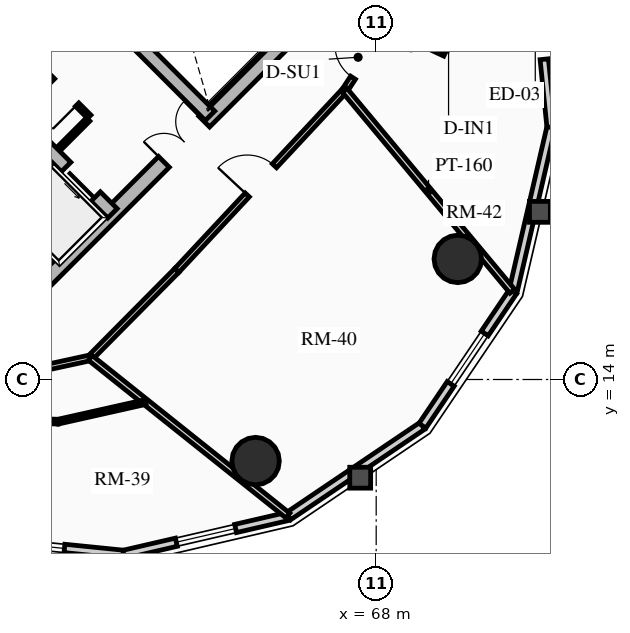
"""IFC4 building model, lengths in metres.
Left out: names, types, materials, properties, quantities, classifications, styles, units other than length and angle.
Written with IfcOpenShell. Run it as: python <this file> out.ifc"""

import sys

from ifc_helpers import new_model, si_unit, direction, frame, frame_2d, origin, origin_2d, place, context, subcontext, project, spatial, rectangle, circle, extrude, source, transform, mapped, element, fill, save


model = new_model("IFC4")
c1 = context("Model", 3, precision=1e-05, world=origin(), true_north=direction((0.0, 1.0)))
c2 = subcontext(c1, "Body", "Model", "MODEL_VIEW")
j1 = project(units=[si_unit("LENGTHUNIT", "METRE"), si_unit("PLANEANGLEUNIT", "RADIAN")], contexts=[c1])
p1 = place(None, origin())
s1 = spatial("IfcSite", under=j1, at=p1, CompositionType="ELEMENT")
p2 = place(p1, origin())
s2 = spatial("IfcBuilding", under=s1, at=p2, CompositionType="ELEMENT")
p3 = place(p2, frame((0.0, 0.0, 171.97)))
s3 = spatial("IfcBuildingStorey", under=s2, at=p3, CompositionType="ELEMENT", Elevation=171.97)
p4 = place(p3, frame((58.561, 15.873, 0.0), z_axis=(0.0, 0.0, 1.0), x_axis=(0.707106781187, 0.707106781187, 0.0)))
e1 = element("IfcWall", 1, at=p4, inside=s3, PredefinedType="SHEAR", context=c2, shape_type="SweptSolid", body=[
    extrude(rectangle(XDim=10.7, YDim=0.4, at=frame_2d((5.35, 0.0))), origin(), (0.0, 0.0, 1.0), 2.91),
])
m1 = source(origin(), c2, "Body", "SweptSolid", [
    extrude(rectangle(XDim=1.5, YDim=2.02, at=frame_2d((0.75, 1.01))), frame((0.0, 0.21, 0.0), z_axis=(0.0, -1.0, 0.0), x_axis=(1.0, 0.0, 0.0)), (0.0, 0.0, 1.0), 0.42),
])
p5 = place(p4, frame((5.45, 0.0, 0.0)))
e2 = element("IfcOpeningElement", 2, at=p5, cuts=e1, PredefinedType="OPENING", context=c2, shape_type="MappedRepresentation", body=[
    mapped(m1, transform((0.0, 0.0, 0.0), x_axis=(1.0, 0.0, 0.0), y_axis=(0.0, 1.0, 0.0), z_axis=(0.0, 0.0, 1.0), scale=1.0)),
])
p6 = place(p3, frame((61.06, 18.373, 0.0), z_axis=(0.0, 0.0, 1.0), x_axis=(-0.707106781187, 0.707106781187, 0.0)))
e3 = element("IfcWall", 3, at=p6, inside=s3, PredefinedType="SHEAR", context=c2, shape_type="SweptSolid", body=[
    extrude(rectangle(XDim=13.7, YDim=0.35, at=frame_2d((6.85, 0.0))), origin(), (0.0, 0.0, 1.0), 2.91),
])
m2 = source(origin(), c2, "Body", "SweptSolid", [
    extrude(rectangle(XDim=1.1, YDim=2.015, at=frame_2d((0.55, 1.007))), frame((0.0, 0.185, 0.0), z_axis=(0.0, -1.0, 0.0), x_axis=(1.0, 0.0, 0.0)), (0.0, 0.0, 1.0), 0.37),
])
p7 = place(p6, frame((4.85, 0.0, 0.0)))
e4 = element("IfcOpeningElement", 4, at=p7, cuts=e3, PredefinedType="OPENING", context=c2, shape_type="MappedRepresentation", body=[
    mapped(m2, transform((0.0, 0.0, 0.0), x_axis=(1.0, 0.0, 0.0), y_axis=(0.0, 1.0, 0.0), z_axis=(0.0, 0.0, 1.0), scale=1.0)),
])
p8 = place(p6, frame((0.625, 0.0, 0.0)))
e5 = element("IfcOpeningElement", 5, at=p8, cuts=e3, PredefinedType="OPENING", context=c2, shape_type="MappedRepresentation", body=[
    mapped(m2, transform((0.0, 0.0, 0.0), x_axis=(1.0, 0.0, 0.0), y_axis=(0.0, 1.0, 0.0), z_axis=(0.0, 0.0, 1.0), scale=1.0)),
])
p9 = place(p6, frame((2.625, 0.0, 0.0)))
e6 = element("IfcOpeningElement", 6, at=p9, cuts=e3, PredefinedType="OPENING", context=c2, shape_type="MappedRepresentation", body=[
    mapped(m2, transform((0.0, 0.0, 0.0), x_axis=(1.0, 0.0, 0.0), y_axis=(0.0, 1.0, 0.0), z_axis=(0.0, 0.0, 1.0), scale=1.0)),
])
m3 = source(origin(), c2, "Body", "SweptSolid", [
    extrude(rectangle(XDim=1.15, YDim=2.02, at=frame_2d((0.575, 1.01))), frame((0.0, 0.185, 0.0), z_axis=(0.0, -1.0, 0.0), x_axis=(1.0, 0.0, 0.0)), (0.0, 0.0, 1.0), 0.37),
])
p10 = place(p6, frame((7.27, 0.0, 0.0)))
e7 = element("IfcOpeningElement", 7, at=p10, cuts=e3, PredefinedType="OPENING", context=c2, shape_type="MappedRepresentation", body=[
    mapped(m3, transform((0.0, 0.0, 0.0), x_axis=(1.0, 0.0, 0.0), y_axis=(0.0, 1.0, 0.0), z_axis=(0.0, 0.0, 1.0), scale=1.0)),
])
p11 = place(p3, frame((63.627, 20.94, 0.0), z_axis=(0.0, 0.0, 1.0), x_axis=(-0.707119496762, 0.707094065383, 0.0)))
e8 = element("IfcWall", 8, at=p11, inside=s3, PredefinedType="SHEAR", context=c2, shape_type="SweptSolid", body=[
    extrude(rectangle(XDim=9.6, YDim=0.35, at=frame_2d((4.8, 0.0))), origin(), (0.0, 0.0, 1.0), 2.91),
])
p12 = place(p11, frame((5.28, 0.0, 0.0)))
e9 = element("IfcOpeningElement", 9, at=p12, cuts=e8, PredefinedType="OPENING", context=c2, shape_type="MappedRepresentation", body=[
    mapped(m3, transform((0.0, 0.0, 0.0), x_axis=(1.0, 0.0, 0.0), y_axis=(0.0, 1.0, 0.0), z_axis=(0.0, 0.0, 1.0), scale=1.0)),
])
for number, where, z_axis, x_axis in (
    (10, (64.827, 11.854, 0.0), (0.0, 0.0, 1.0), (1.0, 0.0, 0.0)),
    (11, (70.146, 17.173, 0.0), (0.0, 0.0, 1.0), (1.0, 0.0, 0.0)),
):
    element("IfcColumn", number, at=place(p3, frame(where, z_axis=z_axis, x_axis=x_axis)), inside=s3, PredefinedType="USERDEFINED", context=c2, shape_type="SweptSolid", body=[
        extrude(circle(Radius=0.625, at=origin_2d()), origin(), (0.0, 0.0, 1.0), 2.91),
    ])
p13 = place(p3, frame((61.355, 9.397, 0.0), z_axis=(0.0, 0.0, 1.0), x_axis=(-0.994943283129, 0.100438356004, 0.0)))
e12 = element("IfcWall", 12, at=p13, inside=s3, PredefinedType="SOLIDWALL", context=c2, shape_type="SweptSolid", body=[
    extrude(rectangle(XDim=4.733, YDim=0.22, at=frame_2d((2.366, 0.0))), origin(), (0.0, 0.0, 1.0), 2.245),
])
m4 = source(origin(), c2, "Body", "SweptSolid", [
    extrude(rectangle(XDim=1.6, YDim=1.3, at=frame_2d((0.8, 0.65))), frame((0.0, 0.12, 0.0), z_axis=(0.0, -1.0, 0.0), x_axis=(1.0, 0.0, 0.0)), (0.0, 0.0, 1.0), 0.24),
])
p14 = place(p13, frame((1.566, 0.0, 0.65)))
e13 = element("IfcOpeningElement", 13, at=p14, cuts=e12, PredefinedType="OPENING", context=c2, shape_type="MappedRepresentation", body=[
    mapped(m4, transform((0.0, 0.0, 0.0), x_axis=(1.0, 0.0, 0.0), y_axis=(0.0, 1.0, 0.0), z_axis=(0.0, 0.0, 1.0), scale=1.0)),
])
p15 = place(p3, frame((65.687, 10.4, 0.0), z_axis=(0.0, 0.0, 1.0), x_axis=(-0.97422620202, -0.22557328587, 0.0)))
e14 = element("IfcWall", 14, at=p15, inside=s3, PredefinedType="SOLIDWALL", context=c2, shape_type="SweptSolid", body=[
    extrude(rectangle(XDim=4.446, YDim=0.22, at=frame_2d((2.223, 0.0))), origin(), (0.0, 0.0, 1.0), 2.245),
])
p16 = place(p15, frame((1.423, 0.0, 0.65)))
e15 = element("IfcOpeningElement", 15, at=p16, cuts=e14, PredefinedType="OPENING", context=c2, shape_type="MappedRepresentation", body=[
    mapped(m4, transform((0.0, 0.0, 0.0), x_axis=(1.0, 0.0, 0.0), y_axis=(0.0, 1.0, 0.0), z_axis=(0.0, 0.0, 1.0), scale=1.0)),
])
p17 = place(p3, frame((69.217, 12.783, 0.0), z_axis=(0.0, 0.0, 1.0), x_axis=(-0.828817439852, -0.55951912514, 0.0)))
e16 = element("IfcWall", 16, at=p17, inside=s3, PredefinedType="SOLIDWALL", context=c2, shape_type="SweptSolid", body=[
    extrude(rectangle(XDim=4.259, YDim=0.22, at=frame_2d((2.129, 0.0))), origin(), (0.0, 0.0, 1.0), 2.245),
])
p18 = place(p3, frame((71.6, 16.313, 0.0), z_axis=(0.0, 0.0, 1.0), x_axis=(-0.55951912514, -0.828817439852, 0.0)))
e17 = element("IfcWall", 17, at=p18, inside=s3, PredefinedType="SOLIDWALL", context=c2, shape_type="SweptSolid", body=[
    extrude(rectangle(XDim=4.259, YDim=0.22, at=frame_2d((2.129, 0.0))), origin(), (0.0, 0.0, 1.0), 2.245),
])
p19 = place(p18, frame((1.33, 0.0, 0.65)))
e18 = element("IfcOpeningElement", 18, at=p19, cuts=e17, PredefinedType="OPENING", context=c2, shape_type="MappedRepresentation", body=[
    mapped(m4, transform((0.0, 0.0, 0.0), x_axis=(1.0, 0.0, 0.0), y_axis=(0.0, 1.0, 0.0), z_axis=(0.0, 0.0, 1.0), scale=1.0)),
])
p20 = place(p3, frame((72.603, 20.645, 0.0), z_axis=(0.0, 0.0, 1.0), x_axis=(-0.22557328587, -0.97422620202, 0.0)))
e19 = element("IfcWall", 19, at=p20, inside=s3, PredefinedType="SOLIDWALL", context=c2, shape_type="SweptSolid", body=[
    extrude(rectangle(XDim=4.446, YDim=0.22, at=frame_2d((2.223, 0.0))), origin(), (0.0, 0.0, 1.0), 2.245),
])
p21 = place(p3, frame((72.127, 25.354, 0.0), z_axis=(0.0, 0.0, 1.0), x_axis=(0.100438356004, -0.994943283129, 0.0)))
e20 = element("IfcWall", 20, at=p21, inside=s3, PredefinedType="SOLIDWALL", context=c2, shape_type="SweptSolid", body=[
    extrude(rectangle(XDim=4.733, YDim=0.22, at=frame_2d((2.366, 0.0))), origin(), (0.0, 0.0, 1.0), 2.245),
])
m5 = source(origin(), c2, "Body", "SweptSolid", [
    extrude(rectangle(XDim=1.15, YDim=2.005, at=frame_2d((0.575, 1.002))), frame((0.0, 0.12, 0.0), z_axis=(0.0, -1.0, 0.0), x_axis=(1.0, 0.0, 0.0)), (0.0, 0.0, 1.0), 0.24),
])
p22 = place(p21, frame((1.791, 0.0, 0.0)))
e21 = element("IfcOpeningElement", 21, at=p22, cuts=e20, PredefinedType="OPENING", context=c2, shape_type="MappedRepresentation", body=[
    mapped(m5, transform((0.0, 0.0, 0.0), x_axis=(1.0, 0.0, 0.0), y_axis=(0.0, 1.0, 0.0), z_axis=(0.0, 0.0, 1.0), scale=1.0)),
])
p23 = place(p3, frame((58.214, 21.467, 0.0), z_axis=(0.0, 0.0, 1.0), x_axis=(0.707106781187, 0.707106781187, 0.0)))
e22 = element("IfcWall", 22, at=p23, inside=s3, PredefinedType="PARTITIONING", context=c2, shape_type="SweptSolid", body=[
    extrude(rectangle(XDim=3.28, YDim=0.2, at=frame_2d((1.64, 0.0))), origin(), (0.0, 0.0, 1.0), 2.675),
])
m6 = source(origin(), c2, "Body", "SweptSolid", [
    extrude(rectangle(XDim=1.5, YDim=2.02, at=frame_2d((0.75, 1.01))), frame((0.0, 0.11, 0.0), z_axis=(0.0, -1.0, 0.0), x_axis=(1.0, 0.0, 0.0)), (0.0, 0.0, 1.0), 0.22),
])
p24 = place(p23, frame((1.55, 0.0, 0.0)))
e23 = element("IfcOpeningElement", 23, at=p24, cuts=e22, PredefinedType="OPENING", context=c2, shape_type="MappedRepresentation", body=[
    mapped(m6, transform((0.0, 0.0, 0.0), x_axis=(1.0, 0.0, 0.0), y_axis=(0.0, 1.0, 0.0), z_axis=(0.0, 0.0, 1.0), scale=1.0)),
])
p25 = place(p3, frame((60.448, 20.915, 0.0), z_axis=(0.0, 0.0, 1.0), x_axis=(-0.707106781187, 0.707106781187, 0.0)))
e24 = element("IfcWall", 24, at=p25, inside=s3, PredefinedType="PARTITIONING", context=c2, shape_type="SweptSolid", body=[
    extrude(rectangle(XDim=1.87, YDim=0.125, at=frame_2d((0.935, 0.0))), origin(), (0.0, 0.0, 1.0), 2.675),
])
m7 = source(origin(), c2, "Body", "SweptSolid", [
    extrude(rectangle(XDim=0.9, YDim=2.005, at=frame_2d((0.45, 1.002))), frame((0.0, 0.073, 0.0), z_axis=(0.0, -1.0, 0.0), x_axis=(1.0, 0.0, 0.0)), (0.0, 0.0, 1.0), 0.145),
])
p26 = place(p25, frame((0.45, 0.0, 0.0)))
e25 = element("IfcOpeningElement", 25, at=p26, cuts=e24, PredefinedType="OPENING", context=c2, shape_type="MappedRepresentation", body=[
    mapped(m7, transform((0.0, 0.0, 0.0), x_axis=(1.0, 0.0, 0.0), y_axis=(0.0, 1.0, 0.0), z_axis=(0.0, 0.0, 1.0), scale=1.0)),
])
p27 = place(p3, frame((59.643, 20.066, 0.0), z_axis=(0.0, 0.0, 1.0), x_axis=(0.707106781187, 0.707106781187, 0.0)))
e26 = element("IfcWall", 26, at=p27, inside=s3, PredefinedType="PARTITIONING", context=c2, shape_type="SweptSolid", body=[
    extrude(rectangle(XDim=1.1, YDim=0.125, at=frame_2d((0.55, 0.0))), origin(), (0.0, 0.0, 1.0), 2.675),
])
p28 = place(p3, frame((58.959, 14.241, 0.0), z_axis=(0.0, 0.0, 1.0), x_axis=(0.977216106897, 0.212246744196, 0.0)))
e27 = element("IfcWall", 27, at=p28, inside=s3, PredefinedType="PARTITIONING", context=c2, shape_type="SweptSolid", body=[
    extrude(rectangle(XDim=1.552, YDim=0.15, at=frame_2d((0.776, 0.0))), origin(), (0.0, 0.0, 1.0), 2.245),
])
p29 = place(p3, frame((60.475, 14.57, 0.0), z_axis=(0.0, 0.0, 1.0), x_axis=(0.703709284374, 0.710488031628, 0.0)))
e28 = element("IfcWall", 28, at=p29, inside=s3, PredefinedType="PARTITIONING", context=c2, shape_type="SweptSolid", body=[
    extrude(rectangle(XDim=3.241, YDim=0.15, at=frame_2d((1.621, 0.0))), origin(), (0.0, 0.0, 1.0), 2.245),
])
p30 = place(p3, frame((62.756, 16.873, 0.0), z_axis=(0.0, 0.0, 1.0), x_axis=(0.682136885079, 0.73122450042, 0.0)))
e29 = element("IfcWall", 29, at=p30, inside=s3, PredefinedType="PARTITIONING", context=c2, shape_type="SweptSolid", body=[
    extrude(rectangle(XDim=6.476, YDim=0.15, at=frame_2d((3.238, 0.0))), origin(), (0.0, 0.0, 1.0), 2.245),
])
m8 = source(origin(), c2, "Body", "SweptSolid", [
    extrude(rectangle(XDim=1.05, YDim=2.015, at=frame_2d((0.525, 1.007))), frame((0.0, 0.085, 0.0), z_axis=(0.0, -1.0, 0.0), x_axis=(1.0, 0.0, 0.0)), (0.0, 0.0, 1.0), 0.17),
])
p31 = place(p30, frame((2.713, 0.0, 0.0)))
e30 = element("IfcOpeningElement", 30, at=p31, cuts=e29, PredefinedType="OPENING", context=c2, shape_type="MappedRepresentation", body=[
    mapped(m8, transform((0.0, 0.0, 0.0), x_axis=(1.0, 0.0, 0.0), y_axis=(0.0, 1.0, 0.0), z_axis=(0.0, 0.0, 1.0), scale=1.0)),
])
p32 = place(p3, frame((67.173, 21.608, 0.0), z_axis=(0.0, 0.0, 1.0), x_axis=(0.544299403682, 0.838891029367, 0.0)))
e31 = element("IfcWall", 31, at=p32, inside=s3, PredefinedType="PARTITIONING", context=c2, shape_type="SweptSolid", body=[
    extrude(rectangle(XDim=1.844, YDim=0.15, at=frame_2d((0.922, 0.0))), origin(), (0.0, 0.0, 1.0), 2.245),
])
p33 = place(p32, frame((0.397, 0.0, 0.0)))
e32 = element("IfcOpeningElement", 32, at=p33, cuts=e31, PredefinedType="OPENING", context=c2, shape_type="MappedRepresentation", body=[
    mapped(m8, transform((0.0, 0.0, 0.0), x_axis=(1.0, 0.0, 0.0), y_axis=(0.0, 1.0, 0.0), z_axis=(0.0, 0.0, 1.0), scale=1.0)),
])
p34 = place(p3, frame((60.475, 14.57, 0.0), z_axis=(0.0, 0.0, 1.0), x_axis=(0.78156967059, -0.623817962241, 0.0)))
e33 = element("IfcWall", 33, at=p34, inside=s3, PredefinedType="PARTITIONING", context=c2, shape_type="SweptSolid", body=[
    extrude(rectangle(XDim=6.656, YDim=0.16, at=frame_2d((3.328, 0.0))), origin(), (0.0, 0.0, 1.0), 2.245),
])
p35 = place(p3, frame((67.173, 21.608, 0.0), z_axis=(0.0, 0.0, 1.0), x_axis=(0.64050880156, -0.767950828585, 0.0)))
e34 = element("IfcWall", 34, at=p35, inside=s3, PredefinedType="PARTITIONING", context=c2, shape_type="SweptSolid", body=[
    extrude(rectangle(XDim=6.883, YDim=0.16, at=frame_2d((3.441, 0.0))), origin(), (0.0, 0.0, 1.0), 2.245),
])
p36 = place(p3, frame((57.263, 12.972, 0.0), z_axis=(0.0, 0.0, 1.0), x_axis=(0.999399614086, -0.034646953192, 0.0)))
e35 = element("IfcWall", 35, at=p36, inside=s3, PredefinedType="PARTITIONING", context=c2, shape_type="SweptSolid", body=[
    extrude(rectangle(XDim=2.368, YDim=0.125, at=frame_2d((1.184, 0.0))), origin(), (0.0, 0.0, 1.0), 2.245),
])
p37 = place(p3, frame((59.629, 12.89, 0.0), z_axis=(0.0, 0.0, 1.0), x_axis=(0.97566344203, 0.219273454585, 0.0)))
e36 = element("IfcWall", 36, at=p37, inside=s3, PredefinedType="PARTITIONING", context=c2, shape_type="SweptSolid", body=[
    extrude(rectangle(XDim=2.36, YDim=0.125, at=frame_2d((1.18, 0.0))), origin(), (0.0, 0.0, 1.0), 2.245),
])
p38 = place(p3, frame((68.275, 23.28, 0.0), z_axis=(0.0, 0.0, 1.0), x_axis=(0.906681243062, -0.421816457099, 0.0)))
e37 = element("IfcWall", 37, at=p38, inside=s3, PredefinedType="PARTITIONING", context=c2, shape_type="SweptSolid", body=[
    extrude(rectangle(XDim=1.688, YDim=0.125, at=frame_2d((0.844, 0.0))), origin(), (0.0, 0.0, 1.0), 2.675),
])
m9 = source(origin(), c2, "Body", "SweptSolid", [
    extrude(rectangle(XDim=1.6, YDim=1.3, at=frame_2d((0.8, 0.65))), frame((0.0, 0.03, 0.0), z_axis=(0.0, -1.0, 0.0), x_axis=(1.0, 0.0, 0.0)), (0.0, 0.0, 1.0), 0.06),
])
p39 = place(p14, origin())
e38 = element("IfcWindow", 38, at=p39, inside=s3, PartitioningType="SINGLE_PANEL", PredefinedType="WINDOW", context=c2, shape_type="MappedRepresentation", body=[
    mapped(m9, transform((0.0, 0.0, 0.0), x_axis=(1.0, 0.0, 0.0), y_axis=(0.0, 1.0, 0.0), z_axis=(0.0, 0.0, 1.0), scale=1.0)),
])
fill(e13, e38)
p40 = place(p16, origin())
e39 = element("IfcWindow", 39, at=p40, inside=s3, PartitioningType="SINGLE_PANEL", PredefinedType="WINDOW", context=c2, shape_type="MappedRepresentation", body=[
    mapped(m9, transform((0.0, 0.0, 0.0), x_axis=(1.0, 0.0, 0.0), y_axis=(0.0, 1.0, 0.0), z_axis=(0.0, 0.0, 1.0), scale=1.0)),
])
fill(e15, e39)
p41 = place(p19, origin())
e40 = element("IfcWindow", 40, at=p41, inside=s3, PartitioningType="SINGLE_PANEL", PredefinedType="WINDOW", context=c2, shape_type="MappedRepresentation", body=[
    mapped(m9, transform((0.0, 0.0, 0.0), x_axis=(1.0, 0.0, 0.0), y_axis=(0.0, 1.0, 0.0), z_axis=(0.0, 0.0, 1.0), scale=1.0)),
])
fill(e18, e40)
m10 = source(origin(), c2, "Body", "SweptSolid", [
    extrude(rectangle(XDim=1.15, YDim=2.005, at=frame_2d((0.575, 1.002))), frame((0.0, 0.025, 0.0), z_axis=(0.0, -1.0, 0.0), x_axis=(1.0, 0.0, 0.0)), (0.0, 0.0, 1.0), 0.05),
])
p42 = place(p22, origin())
e41 = element("IfcDoor", 41, at=p42, inside=s3, OperationType="SINGLE_SWING_LEFT", PredefinedType="DOOR", context=c2, shape_type="MappedRepresentation", body=[
    mapped(m10, transform((0.0, 0.0, 0.0), x_axis=(1.0, 0.0, 0.0), y_axis=(0.0, 1.0, 0.0), z_axis=(0.0, 0.0, 1.0), scale=1.0)),
])
fill(e21, e41)
m11 = source(origin(), c2, "Body", "SweptSolid", [
    extrude(rectangle(XDim=1.1, YDim=2.015, at=frame_2d((0.55, 1.007))), frame((0.0, 0.025, 0.0), z_axis=(0.0, -1.0, 0.0), x_axis=(1.0, 0.0, 0.0)), (0.0, 0.0, 1.0), 0.05),
])
p43 = place(p8, origin())
e42 = element("IfcDoor", 42, at=p43, inside=s3, OperationType="SLIDING_TO_LEFT", PredefinedType="DOOR", context=c2, shape_type="MappedRepresentation", body=[
    mapped(m11, transform((0.0, 0.0, 0.0), x_axis=(1.0, 0.0, 0.0), y_axis=(0.0, 1.0, 0.0), z_axis=(0.0, 0.0, 1.0), scale=1.0)),
])
fill(e5, e42)
m12 = source(origin(), c2, "Body", "SweptSolid", [
    extrude(rectangle(XDim=1.5, YDim=2.02, at=frame_2d((0.75, 1.01))), frame((0.0, 0.025, 0.0), z_axis=(0.0, -1.0, 0.0), x_axis=(1.0, 0.0, 0.0)), (0.0, 0.0, 1.0), 0.05),
])
p44 = place(p5, origin())
e43 = element("IfcDoor", 43, at=p44, inside=s3, OperationType="DOUBLE_DOOR_SINGLE_SWING", PredefinedType="DOOR", context=c2, shape_type="MappedRepresentation", body=[
    mapped(m12, transform((0.0, 0.0, 0.0), x_axis=(1.0, 0.0, 0.0), y_axis=(0.0, 1.0, 0.0), z_axis=(0.0, 0.0, 1.0), scale=1.0)),
])
fill(e2, e43)
p45 = place(p24, origin())
e44 = element("IfcDoor", 44, at=p45, inside=s3, OperationType="DOUBLE_DOOR_SINGLE_SWING", PredefinedType="DOOR", context=c2, shape_type="MappedRepresentation", body=[
    mapped(m12, transform((0.0, 0.0, 0.0), x_axis=(1.0, 0.0, 0.0), y_axis=(0.0, 1.0, 0.0), z_axis=(0.0, 0.0, 1.0), scale=1.0)),
])
fill(e23, e44)
m13 = source(origin(), c2, "Body", "SweptSolid", [
    extrude(rectangle(XDim=0.9, YDim=2.005, at=frame_2d((0.45, 1.002))), frame((0.0, 0.025, 0.0), z_axis=(0.0, -1.0, 0.0), x_axis=(1.0, 0.0, 0.0)), (0.0, 0.0, 1.0), 0.05),
])
p46 = place(p26, origin())
e45 = element("IfcDoor", 45, at=p46, inside=s3, OperationType="SINGLE_SWING_LEFT", PredefinedType="DOOR", context=c2, shape_type="MappedRepresentation", body=[
    mapped(m13, transform((0.0, 0.0, 0.0), x_axis=(1.0, 0.0, 0.0), y_axis=(0.0, 1.0, 0.0), z_axis=(0.0, 0.0, 1.0), scale=1.0)),
])
fill(e25, e45)
m14 = source(origin(), c2, "Body", "SweptSolid", [
    extrude(rectangle(XDim=1.05, YDim=2.015, at=frame_2d((0.525, 1.007))), frame((0.0, 0.025, 0.0), z_axis=(0.0, -1.0, 0.0), x_axis=(1.0, 0.0, 0.0)), (0.0, 0.0, 1.0), 0.05),
])
p47 = place(p31, origin())
e46 = element("IfcDoor", 46, at=p47, inside=s3, OperationType="SINGLE_SWING_LEFT", PredefinedType="DOOR", context=c2, shape_type="MappedRepresentation", body=[
    mapped(m14, transform((0.0, 0.0, 0.0), x_axis=(1.0, 0.0, 0.0), y_axis=(0.0, 1.0, 0.0), z_axis=(0.0, 0.0, 1.0), scale=1.0)),
])
fill(e30, e46)
p48 = place(p33, origin())
e47 = element("IfcDoor", 47, at=p48, inside=s3, OperationType="SINGLE_SWING_RIGHT", PredefinedType="DOOR", context=c2, shape_type="MappedRepresentation", body=[
    mapped(m14, transform((0.0, 0.0, 0.0), x_axis=(1.0, 0.0, 0.0), y_axis=(0.0, 1.0, 0.0), z_axis=(0.0, 0.0, 1.0), scale=1.0)),
])
fill(e32, e47)
save(model, sys.argv[1])
